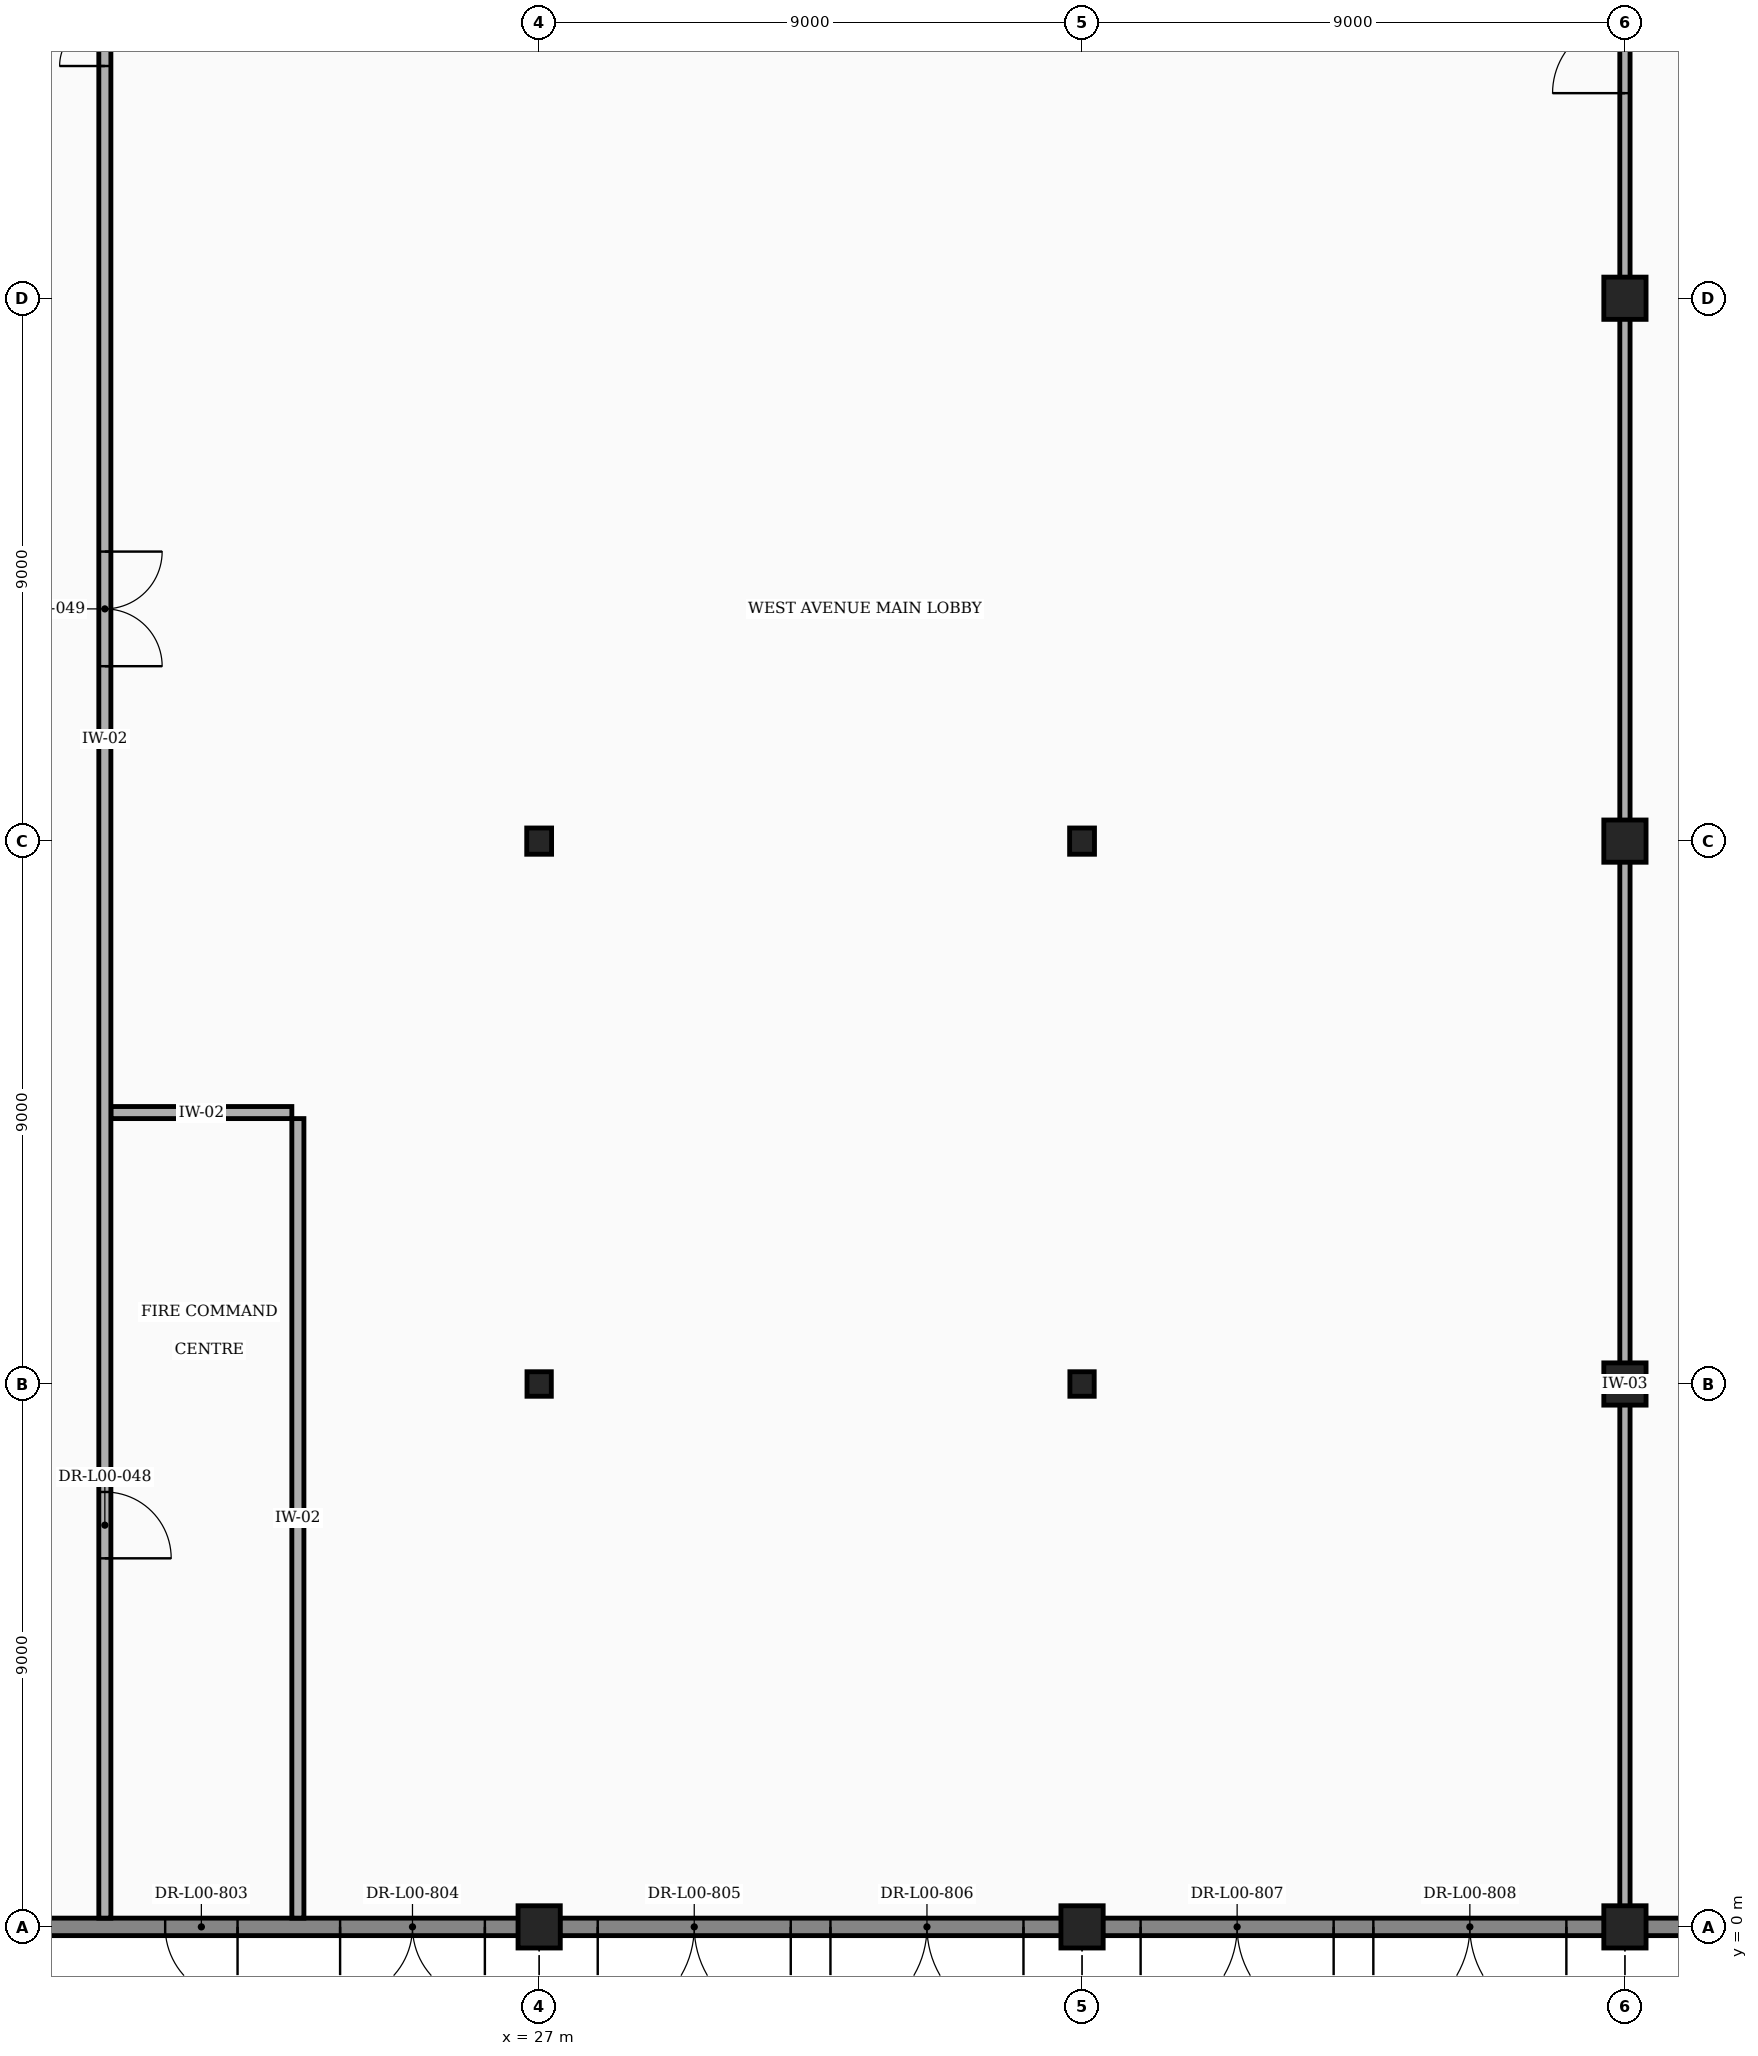
"""IFC4 building model, lengths in metres.
Left out: names, types, materials, properties, quantities, classifications, styles, units other than length and angle.
Written with IfcOpenShell. Run it as: python <this file> out.ifc"""

import sys

from ifc_helpers import new_model, si_unit, direction, frame, frame_2d, origin, origin_2d, place, context, subcontext, project, spatial, rectangle, i_section, extrude, element, fill, save


model = new_model("IFC4")
c1 = context("Model", 3, precision=1e-05, world=origin(), true_north=direction((0.0, 1.0)))
c2 = subcontext(c1, "Body", "Model", "MODEL_VIEW")
j1 = project(units=[si_unit("LENGTHUNIT", "METRE"), si_unit("PLANEANGLEUNIT", "RADIAN")], contexts=[c1])
p1 = place(None, origin())
s1 = spatial("IfcSite", under=j1, at=p1, CompositionType="ELEMENT")
p2 = place(p1, origin())
s2 = spatial("IfcBuilding", under=s1, at=p2, CompositionType="ELEMENT")
p3 = place(p2, origin())
s3 = spatial("IfcBuildingStorey", under=s2, at=p3, CompositionType="ELEMENT", Elevation=0.0)
p4 = place(p3, frame((27.0, 0.0, 0.0), z_axis=(0.0, 0.0, 1.0), x_axis=(1.0, 0.0, 0.0)))
e1 = element("IfcColumn", 1, at=p4, inside=s3, PredefinedType="COLUMN", context=c2, shape_type="SweptSolid", body=[
    extrude(rectangle(XDim=0.7, YDim=0.7, at=origin_2d()), origin(), (0.0, 0.0, 1.0), 6.0),
])
p5 = place(p3, frame((27.0, 9.0, 0.0), z_axis=(0.0, 0.0, 1.0), x_axis=(1.0, 0.0, 0.0)))
e2 = element("IfcColumn", 2, at=p5, inside=s3, PredefinedType="COLUMN", context=c2, shape_type="SweptSolid", body=[
    extrude(i_section(OverallWidth=0.403, OverallDepth=0.406, WebThickness=0.027, FlangeThickness=0.043, at=origin_2d()), origin(), (0.0, 0.0, 1.0), 6.0),
])
p6 = place(p3, frame((27.0, 18.0, 0.0), z_axis=(0.0, 0.0, 1.0), x_axis=(1.0, 0.0, 0.0)))
e3 = element("IfcColumn", 3, at=p6, inside=s3, PredefinedType="COLUMN", context=c2, shape_type="SweptSolid", body=[
    extrude(i_section(OverallWidth=0.412, OverallDepth=0.435, WebThickness=0.036, FlangeThickness=0.058, at=origin_2d()), origin(), (0.0, 0.0, 1.0), 6.0),
])
p7 = place(p3, frame((36.0, 0.0, 0.0), z_axis=(0.0, 0.0, 1.0), x_axis=(1.0, 0.0, 0.0)))
e4 = element("IfcColumn", 4, at=p7, inside=s3, PredefinedType="COLUMN", context=c2, shape_type="SweptSolid", body=[
    extrude(rectangle(XDim=0.7, YDim=0.7, at=origin_2d()), origin(), (0.0, 0.0, 1.0), 6.0),
])
p8 = place(p3, frame((36.0, 9.0, 0.0), z_axis=(0.0, 0.0, 1.0), x_axis=(1.0, 0.0, 0.0)))
e5 = element("IfcColumn", 5, at=p8, inside=s3, PredefinedType="COLUMN", context=c2, shape_type="SweptSolid", body=[
    extrude(i_section(OverallWidth=0.403, OverallDepth=0.406, WebThickness=0.027, FlangeThickness=0.043, at=origin_2d()), origin(), (0.0, 0.0, 1.0), 6.0),
])
p9 = place(p3, frame((36.0, 18.0, 0.0), z_axis=(0.0, 0.0, 1.0), x_axis=(1.0, 0.0, 0.0)))
e6 = element("IfcColumn", 6, at=p9, inside=s3, PredefinedType="COLUMN", context=c2, shape_type="SweptSolid", body=[
    extrude(i_section(OverallWidth=0.412, OverallDepth=0.435, WebThickness=0.036, FlangeThickness=0.058, at=origin_2d()), origin(), (0.0, 0.0, 1.0), 6.0),
])
for number, where, z_axis, x_axis in (
    (7, (45.0, 0.0, 0.0), (0.0, 0.0, 1.0), (1.0, 0.0, 0.0)),
    (8, (45.0, 9.0, 0.0), (0.0, 0.0, 1.0), (1.0, 0.0, 0.0)),
    (9, (45.0, 18.0, 0.0), (0.0, 0.0, 1.0), (1.0, 0.0, 0.0)),
    (10, (45.0, 27.0, 0.0), (0.0, 0.0, 1.0), (1.0, 0.0, 0.0)),
):
    element("IfcColumn", number, at=place(p3, frame(where, z_axis=z_axis, x_axis=x_axis)), inside=s3, PredefinedType="COLUMN", context=c2, shape_type="SweptSolid", body=[
        extrude(rectangle(XDim=0.7, YDim=0.7, at=origin_2d()), origin(), (0.0, 0.0, 1.0), 6.0),
    ])
p10 = place(p3, frame((9.342, 0.0, 0.0), z_axis=(0.0, 0.0, 1.0), x_axis=(1.0, 0.0, 0.0)))
e11 = element("IfcWall", 11, at=p10, inside=s3, PredefinedType="STANDARD", context=c2, shape_type="SweptSolid", body=[
    extrude(rectangle(XDim=17.316, YDim=0.29, at=frame_2d((8.658, 0.0))), origin(), (0.0, 0.0, 1.0), 4.988),
])
p11 = place(p10, frame((11.458, 0.0, 0.0)))
e12 = element("IfcOpeningElement", 12, at=p11, cuts=e11, PredefinedType="OPENING", context=c2, shape_type="SweptSolid", body=[
    extrude(rectangle(XDim=1.2, YDim=2.2, at=frame_2d((0.6, 1.1))), frame((0.0, 0.157, 0.0), z_axis=(0.0, -1.0, 0.0), x_axis=(1.0, 0.0, 0.0)), (0.0, 0.0, 1.0), 0.314),
])
p12 = place(p10, frame((14.358, 0.0, 0.0)))
e13 = element("IfcOpeningElement", 13, at=p12, cuts=e11, PredefinedType="OPENING", context=c2, shape_type="SweptSolid", body=[
    extrude(rectangle(XDim=2.4, YDim=2.4, at=frame_2d((1.2, 1.2))), frame((0.0, 0.157, 0.0), z_axis=(0.0, -1.0, 0.0), x_axis=(1.0, 0.0, 0.0)), (0.0, 0.0, 1.0), 0.314),
])
p13 = place(p10, frame((0.65, 0.0, 0.85)))
e14 = element("IfcOpeningElement", 14, at=p13, cuts=e11, PredefinedType="OPENING", context=c2, shape_type="SweptSolid", body=[
    extrude(rectangle(XDim=3.0, YDim=2.6, at=frame_2d((1.5, 1.3))), frame((0.0, 0.157, 0.0), z_axis=(0.0, -1.0, 0.0), x_axis=(1.0, 0.0, 0.0)), (0.0, 0.0, 1.0), 0.314),
])
p14 = place(p3, frame((27.342, 0.0, 0.0), z_axis=(0.0, 0.0, 1.0), x_axis=(1.0, 0.0, 0.0)))
e15 = element("IfcWall", 15, at=p14, inside=s3, PredefinedType="STANDARD", context=c2, shape_type="SweptSolid", body=[
    extrude(rectangle(XDim=8.316, YDim=0.29, at=frame_2d((4.158, 0.0))), origin(), (0.0, 0.0, 1.0), 5.138),
])
p15 = place(p14, frame((0.629, 0.0, 0.0)))
e16 = element("IfcOpeningElement", 16, at=p15, cuts=e15, PredefinedType="OPENING", context=c2, shape_type="SweptSolid", body=[
    extrude(rectangle(XDim=3.2, YDim=2.4, at=frame_2d((1.6, 1.2))), frame((0.0, 0.157, 0.0), z_axis=(0.0, -1.0, 0.0), x_axis=(1.0, 0.0, 0.0)), (0.0, 0.0, 1.0), 0.314),
])
p16 = place(p14, frame((4.487, 0.0, 0.0)))
e17 = element("IfcOpeningElement", 17, at=p16, cuts=e15, PredefinedType="OPENING", context=c2, shape_type="SweptSolid", body=[
    extrude(rectangle(XDim=3.2, YDim=2.4, at=frame_2d((1.6, 1.2))), frame((0.0, 0.157, 0.0), z_axis=(0.0, -1.0, 0.0), x_axis=(1.0, 0.0, 0.0)), (0.0, 0.0, 1.0), 0.314),
])
p17 = place(p3, frame((36.342, 0.0, 0.0), z_axis=(0.0, 0.0, 1.0), x_axis=(1.0, 0.0, 0.0)))
e18 = element("IfcWall", 18, at=p17, inside=s3, PredefinedType="STANDARD", context=c2, shape_type="SweptSolid", body=[
    extrude(rectangle(XDim=8.316, YDim=0.29, at=frame_2d((4.158, 0.0))), origin(), (0.0, 0.0, 1.0), 5.138),
])
p18 = place(p17, frame((0.629, 0.0, 0.0)))
e19 = element("IfcOpeningElement", 19, at=p18, cuts=e18, PredefinedType="OPENING", context=c2, shape_type="SweptSolid", body=[
    extrude(rectangle(XDim=3.2, YDim=2.4, at=frame_2d((1.6, 1.2))), frame((0.0, 0.157, 0.0), z_axis=(0.0, -1.0, 0.0), x_axis=(1.0, 0.0, 0.0)), (0.0, 0.0, 1.0), 0.314),
])
p19 = place(p17, frame((4.487, 0.0, 0.0)))
e20 = element("IfcOpeningElement", 20, at=p19, cuts=e18, PredefinedType="OPENING", context=c2, shape_type="SweptSolid", body=[
    extrude(rectangle(XDim=3.2, YDim=2.4, at=frame_2d((1.6, 1.2))), frame((0.0, 0.157, 0.0), z_axis=(0.0, -1.0, 0.0), x_axis=(1.0, 0.0, 0.0)), (0.0, 0.0, 1.0), 0.314),
])
p20 = place(p3, frame((45.342, 0.0, 0.0), z_axis=(0.0, 0.0, 1.0), x_axis=(1.0, 0.0, 0.0)))
e21 = element("IfcWall", 21, at=p20, inside=s3, PredefinedType="STANDARD", context=c2, shape_type="SweptSolid", body=[
    extrude(rectangle(XDim=17.316, YDim=0.29, at=frame_2d((8.658, 0.0))), origin(), (0.0, 0.0, 1.0), 4.988),
])
p21 = place(p20, frame((4.736, 0.0, 0.0)))
e22 = element("IfcOpeningElement", 22, at=p21, cuts=e21, PredefinedType="OPENING", context=c2, shape_type="SweptSolid", body=[
    extrude(rectangle(XDim=3.0, YDim=2.4, at=frame_2d((1.5, 1.2))), frame((0.0, 0.157, 0.0), z_axis=(0.0, -1.0, 0.0), x_axis=(1.0, 0.0, 0.0)), (0.0, 0.0, 1.0), 0.314),
])
p22 = place(p20, frame((8.258, 0.0, 0.0)))
e23 = element("IfcOpeningElement", 23, at=p22, cuts=e21, PredefinedType="OPENING", context=c2, shape_type="SweptSolid", body=[
    extrude(rectangle(XDim=3.0, YDim=2.4, at=frame_2d((1.5, 1.2))), frame((0.0, 0.157, 0.0), z_axis=(0.0, -1.0, 0.0), x_axis=(1.0, 0.0, 0.0)), (0.0, 0.0, 1.0), 0.314),
])
p23 = place(p20, frame((12.93, 0.0, 0.0)))
e24 = element("IfcOpeningElement", 24, at=p23, cuts=e21, PredefinedType="OPENING", context=c2, shape_type="SweptSolid", body=[
    extrude(rectangle(XDim=3.0, YDim=2.4, at=frame_2d((1.5, 1.2))), frame((0.0, 0.157, 0.0), z_axis=(0.0, -1.0, 0.0), x_axis=(1.0, 0.0, 0.0)), (0.0, 0.0, 1.0), 0.314),
])
p24 = place(p3, frame((19.9, 13.5, 0.0), z_axis=(0.0, 0.0, 1.0), x_axis=(1.0, 0.0, 0.0)))
e25 = element("IfcWall", 25, at=p24, inside=s3, PredefinedType="PARTITIONING", context=c2, shape_type="SweptSolid", body=[
    extrude(rectangle(XDim=3.0, YDim=0.2, at=frame_2d((1.5, 0.0))), origin(), (0.0, 0.0, 1.0), 5.75),
])
p25 = place(p3, frame((19.8, 0.145, 0.0), z_axis=(0.0, 0.0, 1.0), x_axis=(0.0, 1.0, 0.0)))
e26 = element("IfcWall", 26, at=p25, inside=s3, PredefinedType="PARTITIONING", context=c2, shape_type="SweptSolid", body=[
    extrude(rectangle(XDim=39.095, YDim=0.2, at=frame_2d((19.547, 0.0))), origin(), (0.0, 0.0, 1.0), 5.75),
])
p26 = place(p25, frame((5.965, 0.0, 0.0)))
e27 = element("IfcOpeningElement", 27, at=p26, cuts=e26, PredefinedType="OPENING", context=c2, shape_type="SweptSolid", body=[
    extrude(rectangle(XDim=1.1, YDim=2.2, at=frame_2d((0.55, 1.1))), frame((0.0, 0.112, 0.0), z_axis=(0.0, -1.0, 0.0), x_axis=(1.0, 0.0, 0.0)), (0.0, 0.0, 1.0), 0.224),
])
p27 = place(p25, frame((20.755, 0.0, 0.0)))
e28 = element("IfcOpeningElement", 28, at=p27, cuts=e26, PredefinedType="OPENING", context=c2, shape_type="SweptSolid", body=[
    extrude(rectangle(XDim=1.9, YDim=2.35, at=frame_2d((0.95, 1.175))), frame((0.0, 0.112, 0.0), z_axis=(0.0, -1.0, 0.0), x_axis=(1.0, 0.0, 0.0)), (0.0, 0.0, 1.0), 0.224),
])
p28 = place(p25, frame((30.705, 0.0, 0.0)))
e29 = element("IfcOpeningElement", 29, at=p28, cuts=e26, PredefinedType="OPENING", context=c2, shape_type="SweptSolid", body=[
    extrude(rectangle(XDim=1.5, YDim=2.2, at=frame_2d((0.75, 1.1))), frame((0.0, 0.112, 0.0), z_axis=(0.0, -1.0, 0.0), x_axis=(1.0, 0.0, 0.0)), (0.0, 0.0, 1.0), 0.224),
])
p29 = place(p3, frame((45.0, 0.22, 0.0), z_axis=(0.0, 0.0, 1.0), x_axis=(0.0, 1.0, 0.0)))
e30 = element("IfcWall", 30, at=p29, inside=s3, PredefinedType="PARTITIONING", context=c2, shape_type="SweptSolid", body=[
    extrude(rectangle(XDim=17.56, YDim=0.17, at=frame_2d((8.78, 0.0))), origin(), (0.0, 0.0, 1.0), 5.217),
])
p30 = place(p3, frame((45.0, 18.22, 0.0), z_axis=(0.0, 0.0, 1.0), x_axis=(0.0, 1.0, 0.0)))
e31 = element("IfcWall", 31, at=p30, inside=s3, PredefinedType="PARTITIONING", context=c2, shape_type="SweptSolid", body=[
    extrude(rectangle(XDim=8.56, YDim=0.17, at=frame_2d((4.28, 0.0))), origin(), (0.0, 0.0, 1.0), 5.217),
])
p31 = place(p3, frame((45.0, 27.22, 0.0), z_axis=(0.0, 0.0, 1.0), x_axis=(0.0, 1.0, 0.0)))
e32 = element("IfcWall", 32, at=p31, inside=s3, PredefinedType="PARTITIONING", context=c2, shape_type="SweptSolid", body=[
    extrude(rectangle(XDim=8.56, YDim=0.17, at=frame_2d((4.28, 0.0))), origin(), (0.0, 0.0, 1.0), 5.217),
])
p32 = place(p31, frame((5.98, 0.0, 0.0)))
e33 = element("IfcOpeningElement", 33, at=p32, cuts=e32, PredefinedType="OPENING", context=c2, shape_type="SweptSolid", body=[
    extrude(rectangle(XDim=2.4, YDim=2.35, at=frame_2d((1.2, 1.175))), frame((0.0, 0.097, 0.0), z_axis=(0.0, -1.0, 0.0), x_axis=(1.0, 0.0, 0.0)), (0.0, 0.0, 1.0), 0.194),
])
p33 = place(p31, frame((3.18, 0.0, 0.0)))
e34 = element("IfcOpeningElement", 34, at=p33, cuts=e32, PredefinedType="OPENING", context=c2, shape_type="SweptSolid", body=[
    extrude(rectangle(XDim=2.4, YDim=2.2, at=frame_2d((1.2, 1.1))), frame((0.0, 0.097, 0.0), z_axis=(0.0, -1.0, 0.0), x_axis=(1.0, 0.0, 0.0)), (0.0, 0.0, 1.0), 0.194),
])
p34 = place(p3, frame((23.0, 0.145, 0.0), z_axis=(0.0, 0.0, 1.0), x_axis=(0.0, 1.0, 0.0)))
e35 = element("IfcWall", 35, at=p34, inside=s3, PredefinedType="PARTITIONING", context=c2, shape_type="SweptSolid", body=[
    extrude(rectangle(XDim=13.255, YDim=0.2, at=frame_2d((6.627, 0.0))), origin(), (0.0, 0.0, 1.0), 5.75),
])
p35 = place(p11, frame((1.2, 0.0, 0.0), z_axis=(0.0, 0.0, 1.0), x_axis=(-1.0, 0.0, 0.0)))
e36 = element("IfcDoor", 36, at=p35, inside=s3, OperationType="NOTDEFINED", PredefinedType="DOOR", context=c2, shape_type="SweptSolid", body=[
    extrude(rectangle(XDim=1.2, YDim=2.2, at=frame_2d((0.6, 1.1))), frame((0.0, 0.025, 0.0), z_axis=(0.0, -1.0, 0.0), x_axis=(1.0, 0.0, 0.0)), (0.0, 0.0, 1.0), 0.05),
])
fill(e12, e36)
p36 = place(p12, frame((2.4, 0.0, 0.0), z_axis=(0.0, 0.0, 1.0), x_axis=(-1.0, 0.0, 0.0)))
e37 = element("IfcDoor", 37, at=p36, inside=s3, OperationType="DOUBLE_DOOR_SINGLE_SWING", PredefinedType="DOOR", context=c2, shape_type="SweptSolid", body=[
    extrude(rectangle(XDim=2.4, YDim=2.4, at=frame_2d((1.2, 1.2))), frame((0.0, 0.025, 0.0), z_axis=(0.0, -1.0, 0.0), x_axis=(1.0, 0.0, 0.0)), (0.0, 0.0, 1.0), 0.05),
])
fill(e13, e37)
p37 = place(p15, frame((3.2, 0.0, 0.0), z_axis=(0.0, 0.0, 1.0), x_axis=(-1.0, 0.0, 0.0)))
e38 = element("IfcDoor", 38, at=p37, inside=s3, OperationType="DOUBLE_DOOR_SINGLE_SWING", PredefinedType="DOOR", context=c2, shape_type="SweptSolid", body=[
    extrude(rectangle(XDim=3.2, YDim=2.4, at=frame_2d((1.6, 1.2))), frame((0.0, 0.025, 0.0), z_axis=(0.0, -1.0, 0.0), x_axis=(1.0, 0.0, 0.0)), (0.0, 0.0, 1.0), 0.05),
])
fill(e16, e38)
p38 = place(p16, frame((3.2, 0.0, 0.0), z_axis=(0.0, 0.0, 1.0), x_axis=(-1.0, 0.0, 0.0)))
e39 = element("IfcDoor", 39, at=p38, inside=s3, OperationType="DOUBLE_DOOR_SINGLE_SWING", PredefinedType="DOOR", context=c2, shape_type="SweptSolid", body=[
    extrude(rectangle(XDim=3.2, YDim=2.4, at=frame_2d((1.6, 1.2))), frame((0.0, 0.025, 0.0), z_axis=(0.0, -1.0, 0.0), x_axis=(1.0, 0.0, 0.0)), (0.0, 0.0, 1.0), 0.05),
])
fill(e17, e39)
p39 = place(p18, frame((3.2, 0.0, 0.0), z_axis=(0.0, 0.0, 1.0), x_axis=(-1.0, 0.0, 0.0)))
e40 = element("IfcDoor", 40, at=p39, inside=s3, OperationType="DOUBLE_DOOR_SINGLE_SWING", PredefinedType="DOOR", context=c2, shape_type="SweptSolid", body=[
    extrude(rectangle(XDim=3.2, YDim=2.4, at=frame_2d((1.6, 1.2))), frame((0.0, 0.025, 0.0), z_axis=(0.0, -1.0, 0.0), x_axis=(1.0, 0.0, 0.0)), (0.0, 0.0, 1.0), 0.05),
])
fill(e19, e40)
p40 = place(p19, frame((3.2, 0.0, 0.0), z_axis=(0.0, 0.0, 1.0), x_axis=(-1.0, 0.0, 0.0)))
e41 = element("IfcDoor", 41, at=p40, inside=s3, OperationType="DOUBLE_DOOR_SINGLE_SWING", PredefinedType="DOOR", context=c2, shape_type="SweptSolid", body=[
    extrude(rectangle(XDim=3.2, YDim=2.4, at=frame_2d((1.6, 1.2))), frame((0.0, 0.025, 0.0), z_axis=(0.0, -1.0, 0.0), x_axis=(1.0, 0.0, 0.0)), (0.0, 0.0, 1.0), 0.05),
])
fill(e20, e41)
p41 = place(p26, frame((1.1, 0.0, 0.0), z_axis=(0.0, 0.0, 1.0), x_axis=(-1.0, 0.0, 0.0)))
e42 = element("IfcDoor", 42, at=p41, inside=s3, OperationType="SINGLE_SWING_RIGHT", PredefinedType="DOOR", context=c2, shape_type="SweptSolid", body=[
    extrude(rectangle(XDim=1.1, YDim=2.2, at=frame_2d((0.55, 1.1))), frame((0.0, 0.025, 0.0), z_axis=(0.0, -1.0, 0.0), x_axis=(1.0, 0.0, 0.0)), (0.0, 0.0, 1.0), 0.05),
])
fill(e27, e42)
p42 = place(p27, frame((1.9, 0.0, 0.0), z_axis=(0.0, 0.0, 1.0), x_axis=(-1.0, 0.0, 0.0)))
e43 = element("IfcDoor", 43, at=p42, inside=s3, OperationType="DOUBLE_DOOR_SINGLE_SWING", PredefinedType="DOOR", context=c2, shape_type="SweptSolid", body=[
    extrude(rectangle(XDim=1.9, YDim=2.35, at=frame_2d((0.95, 1.175))), frame((0.0, 0.025, 0.0), z_axis=(0.0, -1.0, 0.0), x_axis=(1.0, 0.0, 0.0)), (0.0, 0.0, 1.0), 0.05),
])
fill(e28, e43)
p43 = place(p28, origin())
e44 = element("IfcDoor", 44, at=p43, inside=s3, OperationType="DOUBLE_DOOR_SINGLE_SWING", PredefinedType="DOOR", context=c2, shape_type="SweptSolid", body=[
    extrude(rectangle(XDim=1.5, YDim=2.2, at=frame_2d((0.75, 1.1))), frame((0.0, 0.025, 0.0), z_axis=(0.0, -1.0, 0.0), x_axis=(1.0, 0.0, 0.0)), (0.0, 0.0, 1.0), 0.05),
])
fill(e29, e44)
p44 = place(p33, origin())
e45 = element("IfcDoor", 45, at=p44, inside=s3, OperationType="DOUBLE_DOOR_SINGLE_SWING", PredefinedType="DOOR", context=c2, shape_type="SweptSolid", body=[
    extrude(rectangle(XDim=2.4, YDim=2.2, at=frame_2d((1.2, 1.1))), frame((0.0, 0.025, 0.0), z_axis=(0.0, -1.0, 0.0), x_axis=(1.0, 0.0, 0.0)), (0.0, 0.0, 1.0), 0.05),
])
fill(e34, e45)
save(model, sys.argv[1])
